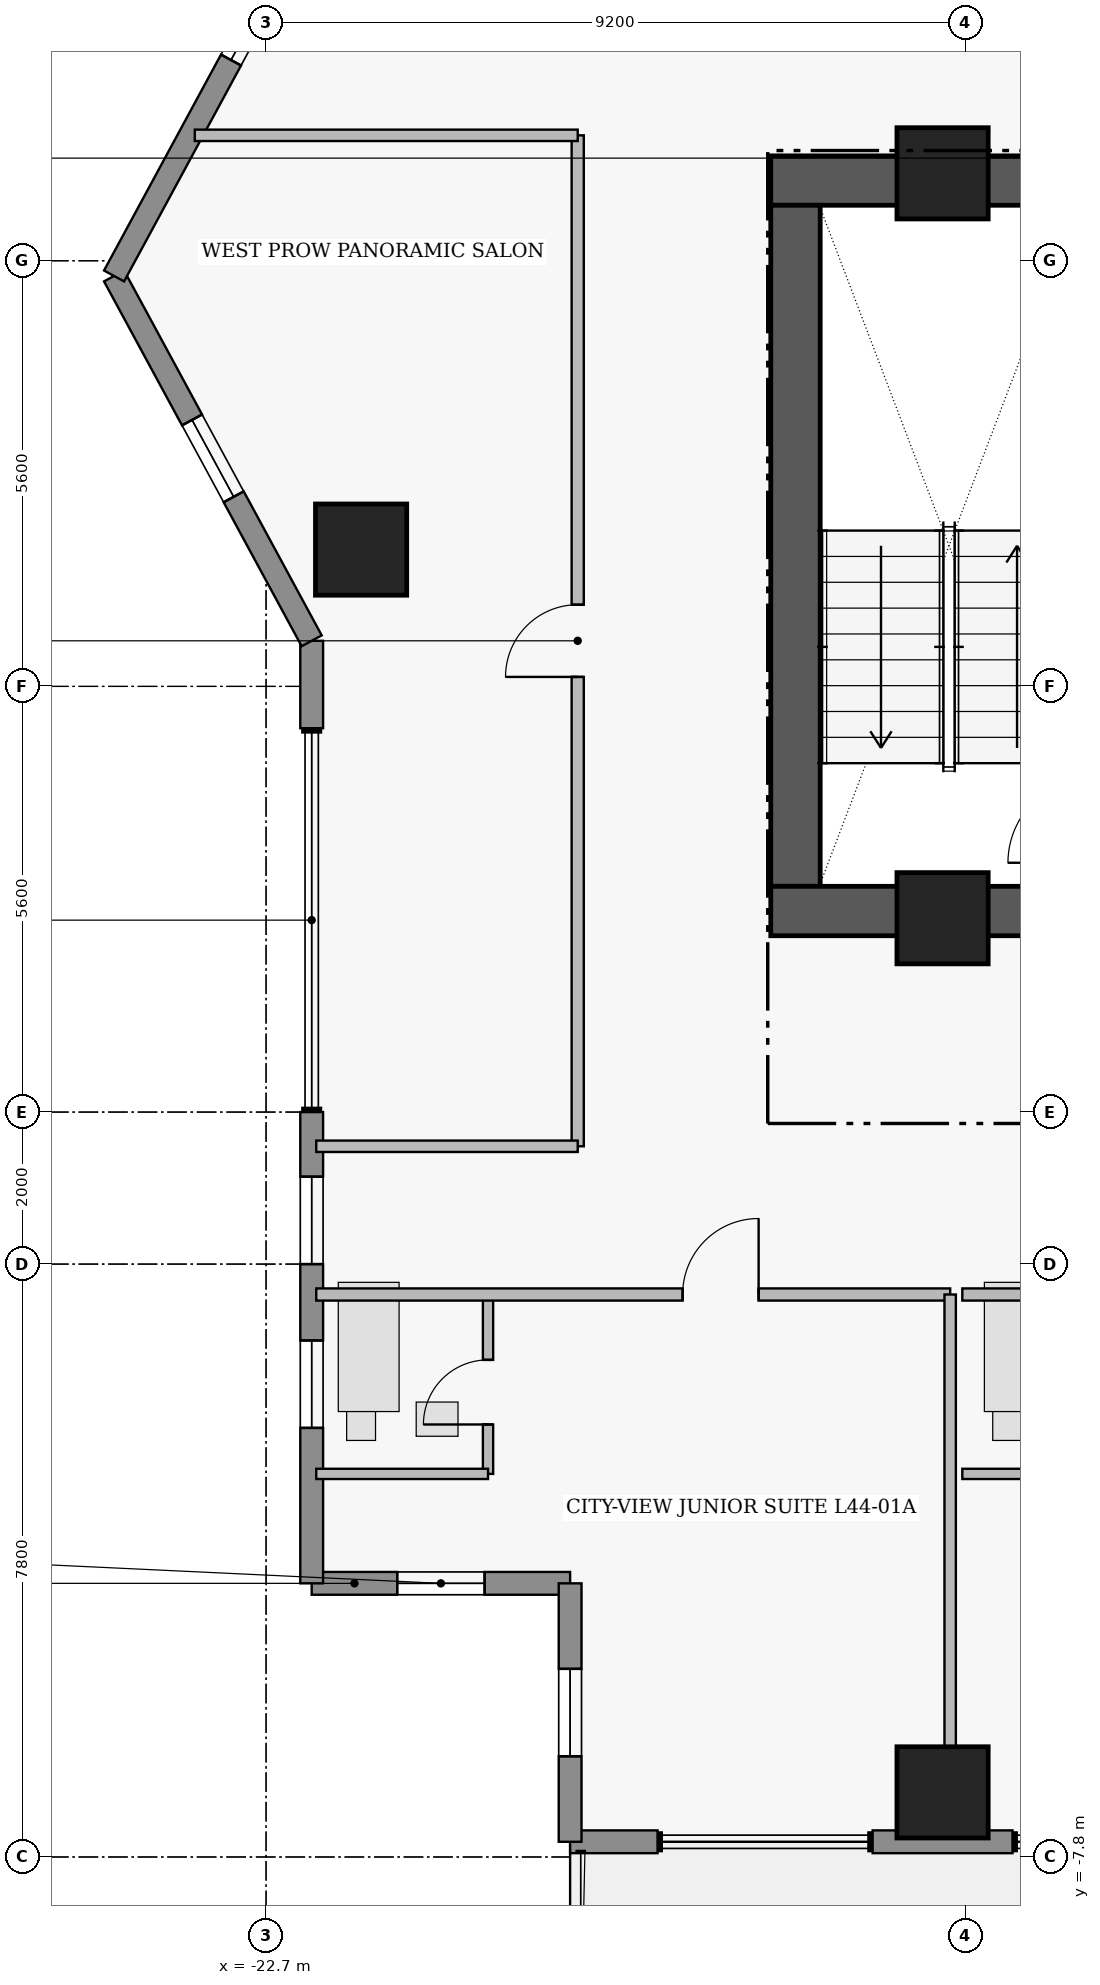
"""IFC4 building model, lengths in metres.
Left out: names, types, materials, properties, quantities, classifications, styles, units other than length and angle.
Written with IfcOpenShell. Run it as: python <this file> out.ifc"""

import sys

from ifc_helpers import new_model, si_unit, direction, frame, frame_2d, origin, origin_2d, place, context, subcontext, project, spatial, rectangle, extrude, element, fill, save


model = new_model("IFC4")
c1 = context("Model", 3, precision=1e-05, world=origin(), true_north=direction((0.0, 1.0)))
c2 = subcontext(c1, "Body", "Model", "MODEL_VIEW")
j1 = project(units=[si_unit("LENGTHUNIT", "METRE"), si_unit("PLANEANGLEUNIT", "RADIAN")], contexts=[c1])
p1 = place(None, origin())
s1 = spatial("IfcSite", under=j1, at=p1, CompositionType="ELEMENT")
p2 = place(p1, origin())
s2 = spatial("IfcBuilding", under=s1, at=p2, CompositionType="ELEMENT")
p3 = place(p2, frame((0.0, 0.0, 177.4)))
s3 = spatial("IfcBuildingStorey", under=s2, at=p3, CompositionType="ELEMENT", Elevation=177.4)
p4 = place(p3, frame((-16.06, 14.255, 0.0), z_axis=(0.0, 0.0, 1.0), x_axis=(1.0, 0.0, 0.0)))
e1 = element("IfcWall", 1, at=p4, inside=s3, PredefinedType="SHEAR", context=c2, shape_type="SweptSolid", body=[
    extrude(rectangle(XDim=4.46, YDim=0.65, at=frame_2d((2.23, 0.0))), origin(), (0.0, 0.0, 1.0), 3.56),
])
p5 = place(p3, frame((-15.735, 4.97, 0.0), z_axis=(0.0, 0.0, 1.0), x_axis=(0.0, 1.0, 0.0)))
e2 = element("IfcWall", 2, at=p5, inside=s3, PredefinedType="SHEAR", context=c2, shape_type="SweptSolid", body=[
    extrude(rectangle(XDim=8.96, YDim=0.65, at=frame_2d((4.48, 0.0))), origin(), (0.0, 0.0, 1.0), 3.56),
])
p6 = place(p3, frame((-16.06, 4.645, 0.0), z_axis=(0.0, 0.0, 1.0), x_axis=(1.0, 0.0, 0.0)))
e3 = element("IfcWall", 3, at=p6, inside=s3, PredefinedType="SHEAR", context=c2, shape_type="SweptSolid", body=[
    extrude(rectangle(XDim=4.46, YDim=0.65, at=frame_2d((2.23, 0.0))), origin(), (0.0, 0.0, 1.0), 3.56),
])
for number, where, z_axis, x_axis in (
    (4, (-13.8, 14.35, 0.0), (0.0, 0.0, 1.0), (1.0, 0.0, 0.0)),
    (5, (-13.8, 4.55, 0.0), (0.0, 0.0, 1.0), (1.0, 0.0, 0.0)),
    (6, (-13.8, -6.95, 0.0), (0.0, 0.0, 1.0), (1.0, 0.0, 0.0)),
    (7, (-21.45, 9.4, 0.0), (0.0, 0.0, 1.0), (1.0, 0.0, 0.0)),
):
    element("IfcColumn", number, at=place(p3, frame(where, z_axis=z_axis, x_axis=x_axis)), inside=s3, PredefinedType="COLUMN", context=c2, shape_type="SweptSolid", body=[
        extrude(rectangle(XDim=1.2, YDim=1.2, at=origin_2d()), origin(), (0.0, 0.0, 1.0), 3.75),
    ])
p7 = place(p3, frame((-18.7, -4.2, 0.0), z_axis=(0.0, 0.0, 1.0), x_axis=(-1.0, 0.0, 0.0)))
e8 = element("IfcWall", 8, at=p7, inside=s3, PredefinedType="STANDARD", context=c2, shape_type="SweptSolid", body=[
    extrude(rectangle(XDim=3.4, YDim=0.3, at=frame_2d((1.7, 0.0))), origin(), (0.0, 0.0, 1.0), 3.53),
])
p8 = place(p7, frame((1.125, 0.0, 1.25)))
e9 = element("IfcOpeningElement", 9, at=p8, cuts=e8, PredefinedType="OPENING", context=c2, shape_type="SweptSolid", body=[
    extrude(rectangle(XDim=1.15, YDim=1.55, at=frame_2d((0.575, 0.775))), frame((0.0, 0.16, 0.0), z_axis=(0.0, -1.0, 0.0), x_axis=(1.0, 0.0, 0.0)), (0.0, 0.0, 1.0), 0.32),
])
p9 = place(p3, frame((-22.1, -4.2, 0.0), z_axis=(0.0, 0.0, 1.0), x_axis=(0.0, 1.0, 0.0)))
e10 = element("IfcWall", 10, at=p9, inside=s3, PredefinedType="STANDARD", context=c2, shape_type="SweptSolid", body=[
    extrude(rectangle(XDim=6.2, YDim=0.3, at=frame_2d((3.1, 0.0))), origin(), (0.0, 0.0, 1.0), 3.53),
])
p10 = place(p9, frame((2.045, 0.0, 0.95)))
e11 = element("IfcOpeningElement", 11, at=p10, cuts=e10, PredefinedType="OPENING", context=c2, shape_type="SweptSolid", body=[
    extrude(rectangle(XDim=1.15, YDim=1.55, at=frame_2d((0.575, 0.775))), frame((0.0, 0.16, 0.0), z_axis=(0.0, -1.0, 0.0), x_axis=(1.0, 0.0, 0.0)), (0.0, 0.0, 1.0), 0.32),
])
p11 = place(p9, frame((4.2, 0.0, 0.95)))
e12 = element("IfcOpeningElement", 12, at=p11, cuts=e10, PredefinedType="OPENING", context=c2, shape_type="SweptSolid", body=[
    extrude(rectangle(XDim=1.15, YDim=1.55, at=frame_2d((0.575, 0.775))), frame((0.0, 0.16, 0.0), z_axis=(0.0, -1.0, 0.0), x_axis=(1.0, 0.0, 0.0)), (0.0, 0.0, 1.0), 0.32),
])
p12 = place(p3, frame((-22.1, 7.05, 0.0), z_axis=(0.0, 0.0, 1.0), x_axis=(0.0, 1.0, 0.0)))
e13 = element("IfcWall", 13, at=p12, inside=s3, PredefinedType="STANDARD", context=c2, shape_type="SweptSolid", body=[
    extrude(rectangle(XDim=1.15, YDim=0.3, at=frame_2d((0.575, 0.0))), origin(), (0.0, 0.0, 1.0), 3.53),
])
p13 = place(p3, frame((-22.1, 8.2, 0.0), z_axis=(0.0, 0.0, 1.0), x_axis=(-0.476258655584, 0.879305233114, 0.0)))
e14 = element("IfcWall", 14, at=p13, inside=s3, PredefinedType="STANDARD", context=c2, shape_type="SweptSolid", body=[
    extrude(rectangle(XDim=5.459, YDim=0.3, at=frame_2d((2.729, 0.0))), origin(), (0.0, 0.0, 1.0), 3.53),
])
p14 = place(p13, frame((2.155, 0.0, 1.25)))
e15 = element("IfcOpeningElement", 15, at=p14, cuts=e14, PredefinedType="OPENING", context=c2, shape_type="SweptSolid", body=[
    extrude(rectangle(XDim=1.15, YDim=1.55, at=frame_2d((0.575, 0.775))), frame((0.0, 0.16, 0.0), z_axis=(0.0, -1.0, 0.0), x_axis=(1.0, 0.0, 0.0)), (0.0, 0.0, 1.0), 0.32),
])
p15 = place(p3, frame((-24.7, 13.0, 0.0), z_axis=(0.0, 0.0, 1.0), x_axis=(0.476258655584, 0.879305233114, 0.0)))
e16 = element("IfcWall", 16, at=p15, inside=s3, PredefinedType="STANDARD", context=c2, shape_type="SweptSolid", body=[
    extrude(rectangle(XDim=5.459, YDim=0.3, at=frame_2d((2.729, 0.0))), origin(), (0.0, 0.0, 1.0), 3.53),
])
p16 = place(p15, frame((3.231, 0.0, 1.25)))
e17 = element("IfcOpeningElement", 17, at=p16, cuts=e16, PredefinedType="OPENING", context=c2, shape_type="SweptSolid", body=[
    extrude(rectangle(XDim=1.15, YDim=1.55, at=frame_2d((0.575, 0.775))), frame((0.0, 0.16, 0.0), z_axis=(0.0, -1.0, 0.0), x_axis=(1.0, 0.0, 0.0)), (0.0, 0.0, 1.0), 0.32),
])
p17 = place(p3, frame((-12.88, -7.6, 0.0), z_axis=(0.0, 0.0, 1.0), x_axis=(-1.0, 0.0, 0.0)))
e18 = element("IfcWall", 18, at=p17, inside=s3, PredefinedType="STANDARD", context=c2, shape_type="SweptSolid", body=[
    extrude(rectangle(XDim=1.84, YDim=0.3, at=frame_2d((0.92, 0.0))), origin(), (0.0, 0.0, 1.0), 3.53),
])
p18 = place(p3, frame((-17.55, -7.6, 0.0), z_axis=(0.0, 0.0, 1.0), x_axis=(-1.0, 0.0, 0.0)))
e19 = element("IfcWall", 19, at=p18, inside=s3, PredefinedType="STANDARD", context=c2, shape_type="SweptSolid", body=[
    extrude(rectangle(XDim=1.15, YDim=0.3, at=frame_2d((0.575, 0.0))), origin(), (0.0, 0.0, 1.0), 3.53),
])
p19 = place(p3, frame((-18.7, -7.6, 0.0), z_axis=(0.0, 0.0, 1.0), x_axis=(0.0, 1.0, 0.0)))
e20 = element("IfcWall", 20, at=p19, inside=s3, PredefinedType="STANDARD", context=c2, shape_type="SweptSolid", body=[
    extrude(rectangle(XDim=3.4, YDim=0.3, at=frame_2d((1.7, 0.0))), origin(), (0.0, 0.0, 1.0), 3.53),
])
p20 = place(p19, frame((1.125, 0.0, 1.25)))
e21 = element("IfcOpeningElement", 21, at=p20, cuts=e20, PredefinedType="OPENING", context=c2, shape_type="SweptSolid", body=[
    extrude(rectangle(XDim=1.15, YDim=1.55, at=frame_2d((0.575, 0.775))), frame((0.0, 0.16, 0.0), z_axis=(0.0, -1.0, 0.0), x_axis=(1.0, 0.0, 0.0)), (0.0, 0.0, 1.0), 0.32),
])
p21 = place(p3, frame((-19.78, -2.76, 0.0), z_axis=(0.0, 0.0, 1.0), x_axis=(0.0, 1.0, 0.0)))
e22 = element("IfcWall", 22, at=p21, inside=s3, PredefinedType="PLUMBINGWALL", context=c2, shape_type="SweptSolid", body=[
    extrude(rectangle(XDim=2.36, YDim=0.135, at=frame_2d((1.18, 0.0))), origin(), (0.0, 0.0, 1.0), 3.53),
])
p22 = place(p21, frame((0.65, 0.0, 0.0)))
e23 = element("IfcOpeningElement", 23, at=p22, cuts=e22, PredefinedType="OPENING", context=c2, shape_type="SweptSolid", body=[
    extrude(rectangle(XDim=0.85, YDim=2.1, at=frame_2d((0.425, 1.05))), frame((0.0, 0.077, 0.0), z_axis=(0.0, -1.0, 0.0), x_axis=(1.0, 0.0, 0.0)), (0.0, 0.0, 1.0), 0.155),
])
p23 = place(p3, frame((-22.04, -0.4, 0.0), z_axis=(0.0, 0.0, 1.0), x_axis=(1.0, 0.0, 0.0)))
e24 = element("IfcWall", 24, at=p23, inside=s3, PredefinedType="PARTITIONING", context=c2, shape_type="SweptSolid", body=[
    extrude(rectangle(XDim=8.34, YDim=0.16, at=frame_2d((4.17, 0.0))), origin(), (0.0, 0.0, 1.0), 3.53),
])
p24 = place(p23, frame((4.82, 0.0, 0.0)))
e25 = element("IfcOpeningElement", 25, at=p24, cuts=e24, PredefinedType="OPENING", context=c2, shape_type="SweptSolid", body=[
    extrude(rectangle(XDim=1.0, YDim=2.15, at=frame_2d((0.5, 1.075))), frame((0.0, 0.09, 0.0), z_axis=(0.0, -1.0, 0.0), x_axis=(1.0, 0.0, 0.0)), (0.0, 0.0, 1.0), 0.18),
])
p25 = place(p3, frame((-13.54, -0.4, 0.0), z_axis=(0.0, 0.0, 1.0), x_axis=(1.0, 0.0, 0.0)))
e26 = element("IfcWall", 26, at=p25, inside=s3, PredefinedType="PARTITIONING", context=c2, shape_type="SweptSolid", body=[
    extrude(rectangle(XDim=8.34, YDim=0.16, at=frame_2d((4.17, 0.0))), origin(), (0.0, 0.0, 1.0), 3.53),
])
p26 = place(p25, frame((4.82, 0.0, 0.0)))
e27 = element("IfcOpeningElement", 27, at=p26, cuts=e26, PredefinedType="OPENING", context=c2, shape_type="SweptSolid", body=[
    extrude(rectangle(XDim=1.0, YDim=2.15, at=frame_2d((0.5, 1.075))), frame((0.0, 0.09, 0.0), z_axis=(0.0, -1.0, 0.0), x_axis=(1.0, 0.0, 0.0)), (0.0, 0.0, 1.0), 0.18),
])
p27 = place(p3, frame((-18.6, 1.55, 0.0), z_axis=(0.0, 0.0, 1.0), x_axis=(0.0, 1.0, 0.0)))
e28 = element("IfcWall", 28, at=p27, inside=s3, PredefinedType="PARTITIONING", context=c2, shape_type="SweptSolid", body=[
    extrude(rectangle(XDim=13.3, YDim=0.16, at=frame_2d((6.65, 0.0))), origin(), (0.0, 0.0, 1.0), 3.53),
])
p28 = place(p27, frame((6.175, 0.0, 0.0)))
e29 = element("IfcOpeningElement", 29, at=p28, cuts=e28, PredefinedType="OPENING", context=c2, shape_type="SweptSolid", body=[
    extrude(rectangle(XDim=0.95, YDim=2.15, at=frame_2d((0.475, 1.075))), frame((0.0, 0.09, 0.0), z_axis=(0.0, -1.0, 0.0), x_axis=(1.0, 0.0, 0.0)), (0.0, 0.0, 1.0), 0.18),
])
p29 = place(p3, frame((-22.04, -2.76, 0.0), z_axis=(0.0, 0.0, 1.0), x_axis=(1.0, 0.0, 0.0)))
e30 = element("IfcWall", 30, at=p29, inside=s3, PredefinedType="PLUMBINGWALL", context=c2, shape_type="SweptSolid", body=[
    extrude(rectangle(XDim=2.26, YDim=0.135, at=frame_2d((1.13, 0.0))), origin(), (0.0, 0.0, 1.0), 3.53),
])
p30 = place(p3, frame((-13.7, -7.52, 0.0), z_axis=(0.0, 0.0, 1.0), x_axis=(0.0, 1.0, 0.0)))
e31 = element("IfcWall", 31, at=p30, inside=s3, PredefinedType="PARTITIONING", context=c2, shape_type="SweptSolid", body=[
    extrude(rectangle(XDim=7.12, YDim=0.15, at=frame_2d((3.56, 0.0))), origin(), (0.0, 0.0, 1.0), 2.923),
])
p31 = place(p3, frame((-13.54, -2.76, 0.0), z_axis=(0.0, 0.0, 1.0), x_axis=(1.0, 0.0, 0.0)))
e32 = element("IfcWall", 32, at=p31, inside=s3, PredefinedType="PLUMBINGWALL", context=c2, shape_type="SweptSolid", body=[
    extrude(rectangle(XDim=2.26, YDim=0.135, at=frame_2d((1.13, 0.0))), origin(), (0.0, 0.0, 1.0), 3.124),
])
p32 = place(p3, frame((-22.04, 1.55, 0.0), z_axis=(0.0, 0.0, 1.0), x_axis=(1.0, 0.0, 0.0)))
e33 = element("IfcWall", 33, at=p32, inside=s3, PredefinedType="PARTITIONING", context=c2, shape_type="SweptSolid", body=[
    extrude(rectangle(XDim=3.44, YDim=0.15, at=frame_2d((1.72, 0.0))), origin(), (0.0, 0.0, 1.0), 3.53),
])
p33 = place(p3, frame((-23.638, 14.85, 0.0), z_axis=(0.0, 0.0, 1.0), x_axis=(1.0, 0.0, 0.0)))
e34 = element("IfcWall", 34, at=p33, inside=s3, PredefinedType="PARTITIONING", context=c2, shape_type="SweptSolid", body=[
    extrude(rectangle(XDim=5.038, YDim=0.15, at=frame_2d((2.519, 0.0))), origin(), (0.0, 0.0, 1.0), 3.53),
])
p34 = place(p8, origin())
e35 = element("IfcWindow", 35, at=p34, inside=s3, PartitioningType="SINGLE_PANEL", PredefinedType="WINDOW", context=c2, shape_type="SweptSolid", body=[
    extrude(rectangle(XDim=1.15, YDim=1.55, at=frame_2d((0.575, 0.775))), frame((0.0, 0.03, 0.0), z_axis=(0.0, -1.0, 0.0), x_axis=(1.0, 0.0, 0.0)), (0.0, 0.0, 1.0), 0.06),
])
fill(e9, e35)
p35 = place(p10, origin())
e36 = element("IfcWindow", 36, at=p35, inside=s3, PartitioningType="SINGLE_PANEL", PredefinedType="WINDOW", context=c2, shape_type="SweptSolid", body=[
    extrude(rectangle(XDim=1.15, YDim=1.55, at=frame_2d((0.575, 0.775))), frame((0.0, 0.03, 0.0), z_axis=(0.0, -1.0, 0.0), x_axis=(1.0, 0.0, 0.0)), (0.0, 0.0, 1.0), 0.06),
])
fill(e11, e36)
p36 = place(p11, origin())
e37 = element("IfcWindow", 37, at=p36, inside=s3, PartitioningType="SINGLE_PANEL", PredefinedType="WINDOW", context=c2, shape_type="SweptSolid", body=[
    extrude(rectangle(XDim=1.15, YDim=1.55, at=frame_2d((0.575, 0.775))), frame((0.0, 0.03, 0.0), z_axis=(0.0, -1.0, 0.0), x_axis=(1.0, 0.0, 0.0)), (0.0, 0.0, 1.0), 0.06),
])
fill(e12, e37)
p37 = place(p14, origin())
e38 = element("IfcWindow", 38, at=p37, inside=s3, PartitioningType="SINGLE_PANEL", PredefinedType="WINDOW", context=c2, shape_type="SweptSolid", body=[
    extrude(rectangle(XDim=1.15, YDim=1.55, at=frame_2d((0.575, 0.775))), frame((0.0, 0.03, 0.0), z_axis=(0.0, -1.0, 0.0), x_axis=(1.0, 0.0, 0.0)), (0.0, 0.0, 1.0), 0.06),
])
fill(e15, e38)
p38 = place(p16, origin())
e39 = element("IfcWindow", 39, at=p38, inside=s3, PartitioningType="SINGLE_PANEL", PredefinedType="WINDOW", context=c2, shape_type="SweptSolid", body=[
    extrude(rectangle(XDim=1.15, YDim=1.55, at=frame_2d((0.575, 0.775))), frame((0.0, 0.03, 0.0), z_axis=(0.0, -1.0, 0.0), x_axis=(1.0, 0.0, 0.0)), (0.0, 0.0, 1.0), 0.06),
])
fill(e17, e39)
p39 = place(p20, origin())
e40 = element("IfcWindow", 40, at=p39, inside=s3, PartitioningType="SINGLE_PANEL", PredefinedType="WINDOW", context=c2, shape_type="SweptSolid", body=[
    extrude(rectangle(XDim=1.15, YDim=1.55, at=frame_2d((0.575, 0.775))), frame((0.0, 0.03, 0.0), z_axis=(0.0, -1.0, 0.0), x_axis=(1.0, 0.0, 0.0)), (0.0, 0.0, 1.0), 0.06),
])
fill(e21, e40)
p40 = place(p22, origin())
e41 = element("IfcDoor", 41, at=p40, inside=s3, OperationType="SINGLE_SWING_LEFT", PredefinedType="DOOR", context=c2, shape_type="SweptSolid", body=[
    extrude(rectangle(XDim=0.85, YDim=2.1, at=frame_2d((0.425, 1.05))), frame((0.0, 0.025, 0.0), z_axis=(0.0, -1.0, 0.0), x_axis=(1.0, 0.0, 0.0)), (0.0, 0.0, 1.0), 0.05),
])
fill(e23, e41)
p41 = place(p24, origin())
e42 = element("IfcDoor", 42, at=p41, inside=s3, OperationType="SINGLE_SWING_RIGHT", PredefinedType="DOOR", context=c2, shape_type="SweptSolid", body=[
    extrude(rectangle(XDim=1.0, YDim=2.15, at=frame_2d((0.5, 1.075))), frame((0.0, 0.025, 0.0), z_axis=(0.0, -1.0, 0.0), x_axis=(1.0, 0.0, 0.0)), (0.0, 0.0, 1.0), 0.05),
])
fill(e25, e42)
p42 = place(p28, origin())
e43 = element("IfcDoor", 43, at=p42, inside=s3, OperationType="SINGLE_SWING_LEFT", PredefinedType="DOOR", context=c2, shape_type="SweptSolid", body=[
    extrude(rectangle(XDim=0.95, YDim=2.15, at=frame_2d((0.475, 1.075))), frame((0.0, 0.025, 0.0), z_axis=(0.0, -1.0, 0.0), x_axis=(1.0, 0.0, 0.0)), (0.0, 0.0, 1.0), 0.05),
])
fill(e29, e43)
save(model, sys.argv[1])
